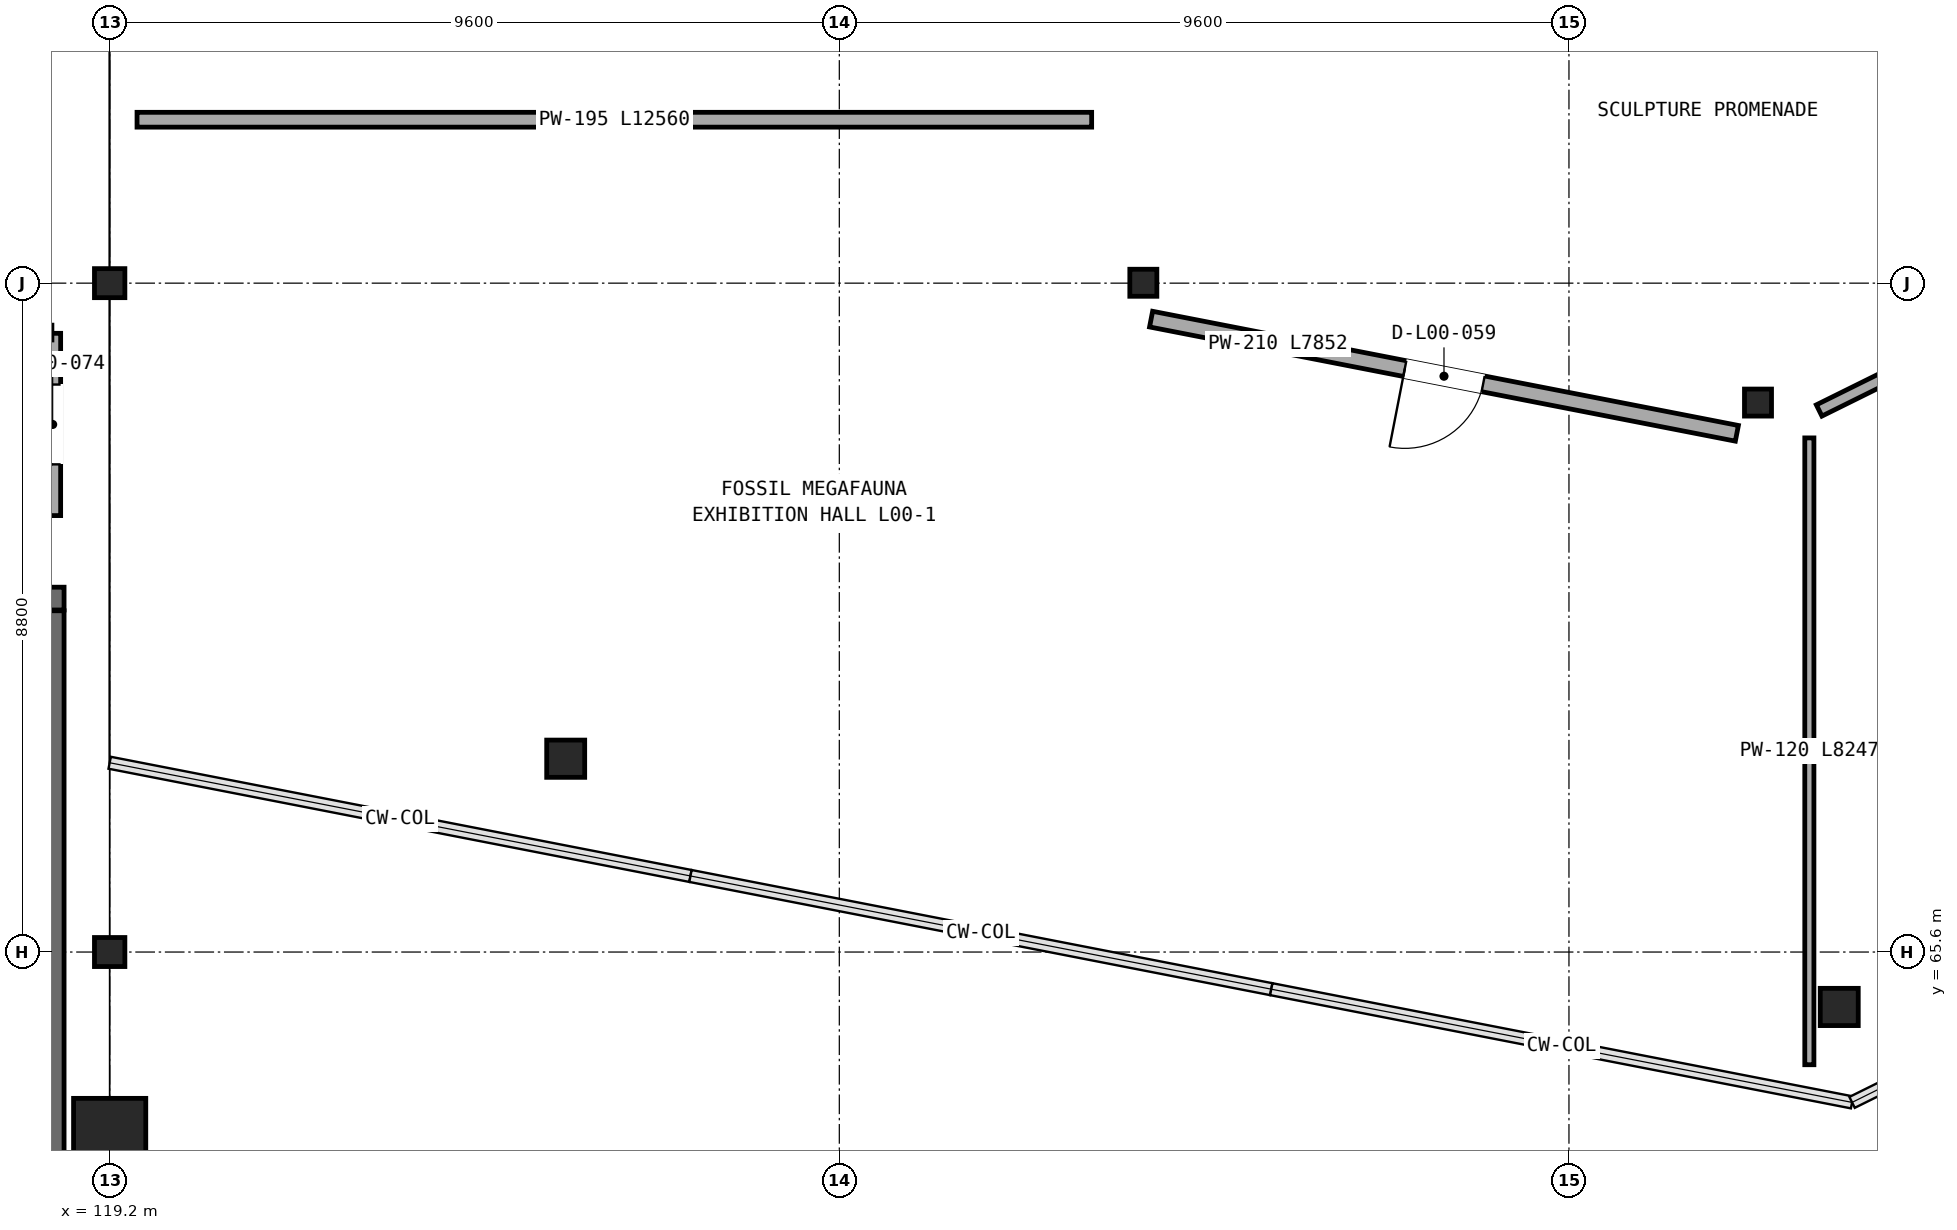
"""IFC4 building model, lengths in metres.
Left out: names, types, materials, properties, quantities, classifications, styles, units other than length and angle.
Written with IfcOpenShell. Run it as: python <this file> out.ifc"""

import sys

from ifc_helpers import new_model, si_unit, direction, frame, frame_2d, origin, origin_2d, place, context, subcontext, project, spatial, rectangle, circle, hollow_circle, i_section, extrude, element, fill, save


model = new_model("IFC4")
c1 = context("Model", 3, precision=1e-05, world=origin(), true_north=direction((0.0, 1.0)))
c2 = subcontext(c1, "Body", "Model", "MODEL_VIEW")
j1 = project(units=[si_unit("LENGTHUNIT", "METRE"), si_unit("PLANEANGLEUNIT", "RADIAN")], contexts=[c1])
p1 = place(None, origin())
s1 = spatial("IfcSite", under=j1, at=p1, CompositionType="ELEMENT")
p2 = place(p1, origin())
s2 = spatial("IfcBuilding", under=s1, at=p2, CompositionType="ELEMENT")
p3 = place(p2, origin())
s3 = spatial("IfcBuildingStorey", under=s2, at=p3, CompositionType="ELEMENT", Elevation=0.0)
for number, where, z_axis, x_axis in (
    (1, (119.2, 65.6, 0.0), (0.0, 0.0, 1.0), (1.0, 0.0, 0.0)),
    (2, (119.2, 74.4, 0.0), (0.0, 0.0, 1.0), (1.0, 0.0, 0.0)),
):
    element("IfcColumn", number, at=place(p3, frame(where, z_axis=z_axis, x_axis=x_axis)), inside=s3, PredefinedType="COLUMN", context=c2, shape_type="SweptSolid", body=[
        extrude(i_section(OverallWidth=0.4, OverallDepth=0.382, WebThickness=0.025, FlangeThickness=0.036, at=origin_2d()), origin(), (0.0, 0.0, 1.0), 5.6),
    ])
p4 = place(p3, frame((119.2, 63.2, 0.0), z_axis=(0.0, 0.0, 1.0), x_axis=(1.0, 0.0, 0.0)))
e3 = element("IfcColumn", 3, at=p4, inside=s3, PredefinedType="COLUMN", context=c2, shape_type="SweptSolid", body=[
    extrude(circle(Radius=0.475, at=origin_2d()), origin(), (0.0, 0.0, 1.0), 5.56),
])
p5 = place(p3, frame((125.2, 68.143, 0.0), z_axis=(0.0, 0.0, 1.0), x_axis=(1.0, 0.0, 0.0)))
e4 = element("IfcColumn", 4, at=p5, inside=s3, PredefinedType="COLUMN", context=c2, shape_type="SweptSolid", body=[
    extrude(i_section(OverallWidth=0.5, OverallDepth=0.49, WebThickness=0.028, FlangeThickness=0.04, at=origin_2d()), origin(), (0.0, 0.0, 1.0), 5.6),
])
p6 = place(p3, frame((132.8, 74.405, 0.0), z_axis=(0.0, 0.0, 1.0), x_axis=(1.0, 0.0, 0.0)))
e5 = element("IfcColumn", 5, at=p6, inside=s3, PredefinedType="COLUMN", context=c2, shape_type="SweptSolid", body=[
    extrude(hollow_circle(Radius=0.178, WallThickness=0.013, at=origin_2d()), origin(), (0.0, 0.0, 1.0), 5.6),
])
p7 = place(p3, frame((141.956, 64.877, 0.0), z_axis=(0.0, 0.0, 1.0), x_axis=(1.0, 0.0, 0.0)))
e6 = element("IfcColumn", 6, at=p7, inside=s3, PredefinedType="COLUMN", context=c2, shape_type="SweptSolid", body=[
    extrude(i_section(OverallWidth=0.5, OverallDepth=0.49, WebThickness=0.028, FlangeThickness=0.04, at=origin_2d()), origin(), (0.0, 0.0, 1.0), 5.6),
])
p8 = place(p3, frame((140.887, 72.829, 0.0), z_axis=(0.0, 0.0, 1.0), x_axis=(1.0, 0.0, 0.0)))
e7 = element("IfcColumn", 7, at=p8, inside=s3, PredefinedType="COLUMN", context=c2, shape_type="SweptSolid", body=[
    extrude(hollow_circle(Radius=0.178, WallThickness=0.013, at=origin_2d()), origin(), (0.0, 0.0, 1.0), 5.6),
])
p9 = place(p3, frame((118.6, 70.25, 0.0), z_axis=(0.0, 0.0, 1.0), x_axis=(-1.0, 0.0, 0.0)))
e8 = element("IfcWall", 8, at=p9, inside=s3, PredefinedType="SHEAR", context=c2, shape_type="SweptSolid", body=[
    extrude(rectangle(XDim=8.4, YDim=0.3, at=frame_2d((4.2, 0.0))), origin(), (0.0, 0.0, 1.0), 5.345),
])
p10 = place(p9, frame((1.025, 0.0, 0.0)))
e9 = element("IfcOpeningElement", 9, at=p10, cuts=e8, PredefinedType="OPENING", context=c2, shape_type="SweptSolid", body=[
    extrude(rectangle(XDim=1.45, YDim=2.25, at=frame_2d((0.725, 1.125))), frame((0.0, 0.16, 0.0), z_axis=(0.0, -1.0, 0.0), x_axis=(1.0, 0.0, 0.0)), (0.0, 0.0, 1.0), 0.32),
])
p11 = place(p3, frame((118.45, 60.31, 0.0), z_axis=(0.0, 0.0, 1.0), x_axis=(0.0, 1.0, 0.0)))
e10 = element("IfcWall", 10, at=p11, inside=s3, PredefinedType="SHEAR", context=c2, shape_type="SweptSolid", body=[
    extrude(rectangle(XDim=9.78, YDim=0.3, at=frame_2d((4.89, 0.0))), origin(), (0.0, 0.0, 1.0), 5.345),
])
p12 = place(p3, frame((132.902, 73.927, 0.0), z_axis=(0.0, 0.0, 1.0), x_axis=(0.98152920164, -0.191312378918, 0.0)))
e11 = element("IfcWall", 11, at=p12, inside=s3, PredefinedType="PARTITIONING", context=c2, shape_type="SweptSolid", body=[
    extrude(rectangle(XDim=7.852, YDim=0.21, at=frame_2d((3.926, 0.0))), origin(), (0.0, 0.0, 1.0), 5.23),
])
p13 = place(p12, frame((3.401, 0.0, 0.0)))
e12 = element("IfcOpeningElement", 12, at=p13, cuts=e11, PredefinedType="OPENING", context=c2, shape_type="SweptSolid", body=[
    extrude(rectangle(XDim=1.05, YDim=2.34, at=frame_2d((0.525, 1.17))), frame((0.0, 0.115, 0.0), z_axis=(0.0, -1.0, 0.0), x_axis=(1.0, 0.0, 0.0)), (0.0, 0.0, 1.0), 0.23),
])
p14 = place(p3, frame((119.56, 76.55, 0.0), z_axis=(0.0, 0.0, 1.0), x_axis=(1.0, 0.0, 0.0)))
e13 = element("IfcWall", 13, at=p14, inside=s3, PredefinedType="PARTITIONING", context=c2, shape_type="SweptSolid", body=[
    extrude(rectangle(XDim=12.56, YDim=0.195, at=frame_2d((6.28, 0.0))), origin(), (0.0, 0.0, 1.0), 4.61),
])
p15 = place(p3, frame((141.692, 72.725, 0.0), z_axis=(0.0, 0.0, 1.0), x_axis=(0.896166209214, 0.443718520532, 0.0)))
e14 = element("IfcWall", 14, at=p15, inside=s3, PredefinedType="PARTITIONING", context=c2, shape_type="SweptSolid", body=[
    extrude(rectangle(XDim=11.467, YDim=0.165, at=frame_2d((5.733, 0.0))), origin(), (0.0, 0.0, 1.0), 5.23),
])
p16 = place(p3, frame((118.45, 71.342, 0.0), z_axis=(0.0, 0.0, 1.0), x_axis=(0.0, 1.0, 0.0)))
e15 = element("IfcWall", 15, at=p16, inside=s3, PredefinedType="PARTITIONING", context=c2, shape_type="SweptSolid", body=[
    extrude(rectangle(XDim=2.398, YDim=0.21, at=frame_2d((1.199, 0.0))), origin(), (0.0, 0.0, 1.0), 5.23),
])
p17 = place(p16, frame((0.674, 0.0, 0.0)))
e16 = element("IfcOpeningElement", 16, at=p17, cuts=e15, PredefinedType="OPENING", context=c2, shape_type="SweptSolid", body=[
    extrude(rectangle(XDim=1.05, YDim=2.15, at=frame_2d((0.525, 1.075))), frame((0.0, 0.115, 0.0), z_axis=(0.0, -1.0, 0.0), x_axis=(1.0, 0.0, 0.0)), (0.0, 0.0, 1.0), 0.23),
])
p18 = place(p3, frame((118.44, 73.75, 0.0), z_axis=(0.0, 0.0, 1.0), x_axis=(-1.0, 0.0, 0.0)))
e17 = element("IfcWall", 17, at=p18, inside=s3, PredefinedType="PARTITIONING", context=c2, shape_type="SweptSolid", body=[
    extrude(rectangle(XDim=8.39, YDim=0.195, at=frame_2d((4.195, 0.0))), origin(), (0.0, 0.0, 1.0), 5.23),
])
p19 = place(p3, frame((141.563, 72.364, 0.0), z_axis=(0.0, 0.0, 1.0), x_axis=(0.0, -1.0, 0.0)))
e18 = element("IfcWall", 18, at=p19, inside=s3, PredefinedType="PARTITIONING", context=c2, shape_type="SweptSolid", body=[
    extrude(rectangle(XDim=8.247, YDim=0.12, at=frame_2d((4.123, 0.0))), origin(), (0.0, 0.0, 1.0), 4.51),
])
p20 = place(p13, frame((1.05, 0.0, 0.0), z_axis=(0.0, 0.0, 1.0), x_axis=(-1.0, 0.0, 0.0)))
e19 = element("IfcDoor", 19, at=p20, inside=s3, OperationType="SINGLE_SWING_LEFT", PredefinedType="DOOR", context=c2, shape_type="SweptSolid", body=[
    extrude(rectangle(XDim=1.05, YDim=2.34, at=frame_2d((0.525, 1.17))), frame((0.0, 0.025, 0.0), z_axis=(0.0, -1.0, 0.0), x_axis=(1.0, 0.0, 0.0)), (0.0, 0.0, 1.0), 0.05),
])
fill(e12, e19)
p21 = place(p17, origin())
e20 = element("IfcDoor", 20, at=p21, inside=s3, OperationType="SINGLE_SWING_LEFT", PredefinedType="DOOR", context=c2, shape_type="SweptSolid", body=[
    extrude(rectangle(XDim=1.05, YDim=2.15, at=frame_2d((0.525, 1.075))), frame((0.0, 0.025, 0.0), z_axis=(0.0, -1.0, 0.0), x_axis=(1.0, 0.0, 0.0)), (0.0, 0.0, 1.0), 0.05),
])
fill(e16, e20)
save(model, sys.argv[1])
